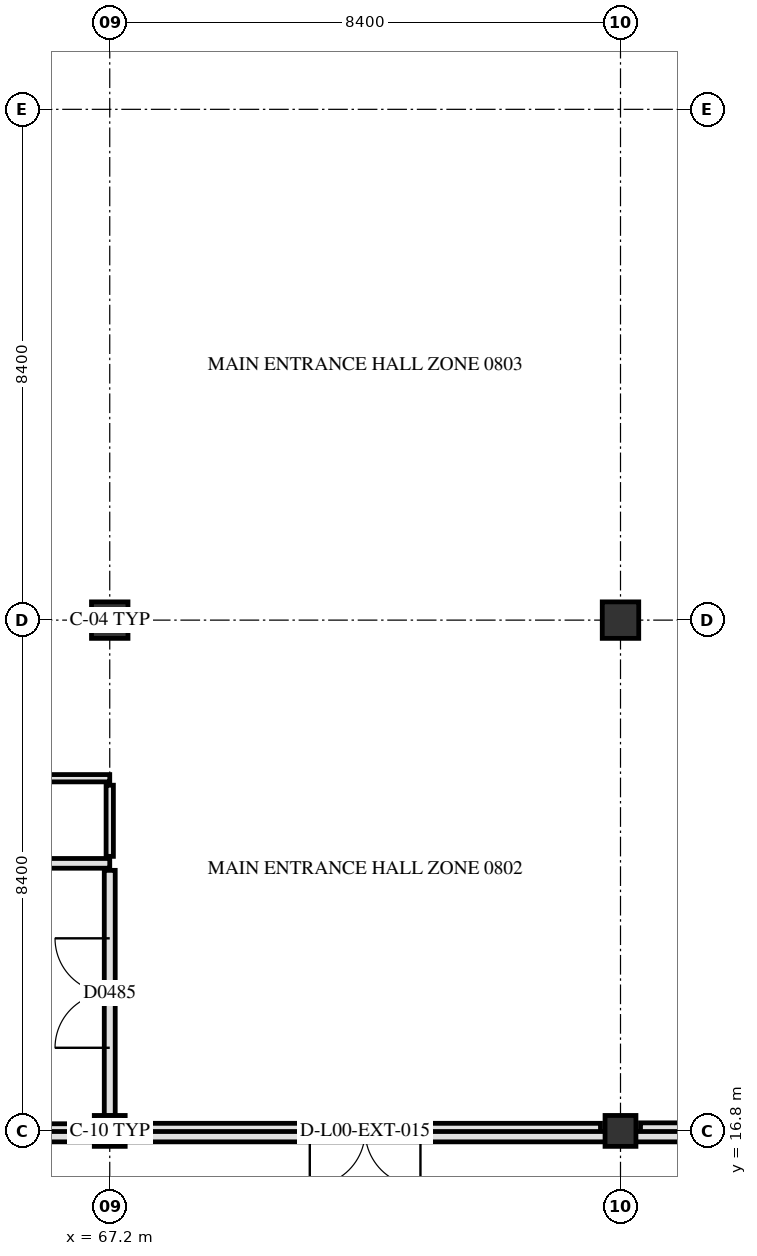
"""IFC4 building model, lengths in metres.
Left out: names, types, materials, properties, quantities, classifications, styles, units other than length and angle.
Written with IfcOpenShell. Run it as: python <this file> out.ifc"""

import sys

from ifc_helpers import new_model, si_unit, direction, frame, frame_2d, origin, origin_2d, place, context, subcontext, project, spatial, rectangle, hollow_circle, extrude, element, fill, save


model = new_model("IFC4")
c1 = context("Model", 3, precision=1e-05, world=origin(), true_north=direction((0.0, 1.0)))
c2 = subcontext(c1, "Body", "Model", "MODEL_VIEW")
j1 = project(units=[si_unit("LENGTHUNIT", "METRE"), si_unit("PLANEANGLEUNIT", "RADIAN")], contexts=[c1])
p1 = place(None, origin())
s1 = spatial("IfcSite", under=j1, at=p1, CompositionType="ELEMENT")
p2 = place(p1, origin())
s2 = spatial("IfcBuilding", under=s1, at=p2, CompositionType="ELEMENT")
p3 = place(p2, origin())
s3 = spatial("IfcBuildingStorey", under=s2, at=p3, CompositionType="ELEMENT", Elevation=0.0)
p4 = place(p3, frame((67.2, 16.8, 0.0), z_axis=(0.0, 0.0, 1.0), x_axis=(1.0, 0.0, 0.0)))
e1 = element("IfcColumn", 1, at=p4, inside=s3, PredefinedType="COLUMN", context=c2, shape_type="SweptSolid", body=[
    extrude(hollow_circle(Radius=0.254, WallThickness=0.02, at=origin_2d()), origin(), (0.0, 0.0, 1.0), 4.8),
])
p5 = place(p3, frame((67.2, 25.2, 0.0), z_axis=(0.0, 0.0, 1.0), x_axis=(1.0, 0.0, 0.0)))
e2 = element("IfcColumn", 2, at=p5, inside=s3, PredefinedType="COLUMN", context=c2, shape_type="SweptSolid", body=[
    extrude(rectangle(XDim=0.6, YDim=0.6, at=origin_2d()), origin(), (0.0, 0.0, 1.0), 4.8),
])
p6 = place(p3, frame((75.6, 16.8, 0.0), z_axis=(0.0, 0.0, 1.0), x_axis=(1.0, 0.0, 0.0)))
e3 = element("IfcColumn", 3, at=p6, inside=s3, PredefinedType="COLUMN", context=c2, shape_type="SweptSolid", body=[
    extrude(hollow_circle(Radius=0.254, WallThickness=0.02, at=origin_2d()), origin(), (0.0, 0.0, 1.0), 4.8),
])
p7 = place(p3, frame((75.6, 25.2, 0.0), z_axis=(0.0, 0.0, 1.0), x_axis=(1.0, 0.0, 0.0)))
e4 = element("IfcColumn", 4, at=p7, inside=s3, PredefinedType="COLUMN", context=c2, shape_type="SweptSolid", body=[
    extrude(rectangle(XDim=0.6, YDim=0.6, at=origin_2d()), origin(), (0.0, 0.0, 1.0), 4.8),
])
p8 = place(p3, frame((83.671, 16.8, 0.0), z_axis=(0.0, 0.0, 1.0), x_axis=(-1.0, 0.0, 0.0)))
e5 = element("IfcWall", 5, at=p8, inside=s3, PredefinedType="SOLIDWALL", context=c2, shape_type="SweptSolid", body=[
    extrude(rectangle(XDim=7.742, YDim=0.265, at=frame_2d((3.871, 0.0))), origin(), (0.0, 0.0, 1.0), 3.79),
])
p9 = place(p8, frame((2.771, 0.0, 0.0)))
e6 = element("IfcOpeningElement", 6, at=p9, cuts=e5, PredefinedType="OPENING", context=c2, shape_type="SweptSolid", body=[
    extrude(rectangle(XDim=2.2, YDim=2.35, at=frame_2d((1.1, 1.175))), frame((0.0, 0.142, 0.0), z_axis=(0.0, -1.0, 0.0), x_axis=(1.0, 0.0, 0.0)), (0.0, 0.0, 1.0), 0.285),
])
p10 = place(p3, frame((75.271, 16.8, 0.0), z_axis=(0.0, 0.0, 1.0), x_axis=(-1.0, 0.0, 0.0)))
e7 = element("IfcWall", 7, at=p10, inside=s3, PredefinedType="SOLIDWALL", context=c2, shape_type="SweptSolid", body=[
    extrude(rectangle(XDim=7.742, YDim=0.25, at=frame_2d((3.871, 0.0))), origin(), (0.0, 0.0, 1.0), 2.99),
])
p11 = place(p10, frame((2.961, 0.0, 0.0)))
e8 = element("IfcOpeningElement", 8, at=p11, cuts=e7, PredefinedType="OPENING", context=c2, shape_type="SweptSolid", body=[
    extrude(rectangle(XDim=1.82, YDim=2.28, at=frame_2d((0.91, 1.14))), frame((0.0, 0.135, 0.0), z_axis=(0.0, -1.0, 0.0), x_axis=(1.0, 0.0, 0.0)), (0.0, 0.0, 1.0), 0.27),
])
p12 = place(p3, frame((66.871, 16.8, 0.0), z_axis=(0.0, 0.0, 1.0), x_axis=(-1.0, 0.0, 0.0)))
e9 = element("IfcWall", 9, at=p12, inside=s3, PredefinedType="SOLIDWALL", context=c2, shape_type="SweptSolid", body=[
    extrude(rectangle(XDim=7.742, YDim=0.235, at=frame_2d((3.871, 0.0))), origin(), (0.0, 0.0, 1.0), 3.79),
])
p13 = place(p12, frame((2.771, 0.0, 0.0)))
e10 = element("IfcOpeningElement", 10, at=p13, cuts=e9, PredefinedType="OPENING", context=c2, shape_type="SweptSolid", body=[
    extrude(rectangle(XDim=2.2, YDim=2.35, at=frame_2d((1.1, 1.175))), frame((0.0, 0.127, 0.0), z_axis=(0.0, -1.0, 0.0), x_axis=(1.0, 0.0, 0.0)), (0.0, 0.0, 1.0), 0.255),
])
p14 = place(p3, frame((84.0, 16.705, 4.58), z_axis=(0.0, 0.0, 1.0), x_axis=(-1.0, 0.0, 0.0)))
e11 = element("IfcWall", 11, at=p14, inside=s3, PredefinedType="PARAPET", context=c2, shape_type="SweptSolid", body=[
    extrude(rectangle(XDim=25.2, YDim=0.17, at=frame_2d((12.6, 0.0))), origin(), (0.0, 0.0, 1.0), 0.47),
])
p15 = place(p3, frame((63.0, 21.2, 0.0), z_axis=(0.0, 0.0, 1.0), x_axis=(1.0, 0.0, 0.0)))
e12 = element("IfcWall", 12, at=p15, inside=s3, PredefinedType="PARTITIONING", context=c2, shape_type="SweptSolid", body=[
    extrude(rectangle(XDim=4.2, YDim=0.16, at=frame_2d((2.1, 0.0))), origin(), (0.0, 0.0, 1.0), 3.89),
])
p16 = place(p3, frame((63.0, 22.6, 0.0), z_axis=(0.0, 0.0, 1.0), x_axis=(1.0, 0.0, 0.0)))
e13 = element("IfcWall", 13, at=p16, inside=s3, PredefinedType="PARTITIONING", context=c2, shape_type="SweptSolid", body=[
    extrude(rectangle(XDim=4.2, YDim=0.12, at=frame_2d((2.1, 0.0))), origin(), (0.0, 0.0, 1.0), 3.89),
])
p17 = place(p16, frame((1.625, 0.0, 0.0)))
e14 = element("IfcOpeningElement", 14, at=p17, cuts=e13, PredefinedType="OPENING", context=c2, shape_type="SweptSolid", body=[
    extrude(rectangle(XDim=0.95, YDim=2.1, at=frame_2d((0.475, 1.05))), frame((0.0, 0.07, 0.0), z_axis=(0.0, -1.0, 0.0), x_axis=(1.0, 0.0, 0.0)), (0.0, 0.0, 1.0), 0.14),
])
p18 = place(p3, frame((67.2, 17.049, 0.0), z_axis=(0.0, 0.0, 1.0), x_axis=(0.0, 1.0, 0.0)))
e15 = element("IfcWall", 15, at=p18, inside=s3, PredefinedType="PARTITIONING", context=c2, shape_type="SweptSolid", body=[
    extrude(rectangle(XDim=4.036, YDim=0.18, at=frame_2d((2.018, 0.0))), origin(), (0.0, 0.0, 1.0), 3.89),
])
p19 = place(p18, frame((1.118, 0.0, 0.0)))
e16 = element("IfcOpeningElement", 16, at=p19, cuts=e15, PredefinedType="OPENING", context=c2, shape_type="SweptSolid", body=[
    extrude(rectangle(XDim=1.8, YDim=2.25, at=frame_2d((0.9, 1.125))), frame((0.0, 0.1, 0.0), z_axis=(0.0, -1.0, 0.0), x_axis=(1.0, 0.0, 0.0)), (0.0, 0.0, 1.0), 0.2),
])
p20 = place(p3, frame((67.2, 21.315, 0.0), z_axis=(0.0, 0.0, 1.0), x_axis=(0.0, 1.0, 0.0)))
e17 = element("IfcWall", 17, at=p20, inside=s3, PredefinedType="PARTITIONING", context=c2, shape_type="SweptSolid", body=[
    extrude(rectangle(XDim=1.17, YDim=0.12, at=frame_2d((0.585, 0.0))), origin(), (0.0, 0.0, 1.0), 3.89),
])
p21 = place(p11, origin())
e18 = element("IfcDoor", 18, at=p21, inside=s3, OperationType="DOUBLE_SWING_LEFT", PredefinedType="DOOR", context=c2, shape_type="SweptSolid", body=[
    extrude(rectangle(XDim=1.82, YDim=2.28, at=frame_2d((0.91, 1.14))), frame((0.0, 0.025, 0.0), z_axis=(0.0, -1.0, 0.0), x_axis=(1.0, 0.0, 0.0)), (0.0, 0.0, 1.0), 0.05),
])
fill(e8, e18)
p22 = place(p19, origin())
e19 = element("IfcDoor", 19, at=p22, inside=s3, OperationType="DOUBLE_SWING_RIGHT", PredefinedType="DOOR", context=c2, shape_type="SweptSolid", body=[
    extrude(rectangle(XDim=1.8, YDim=2.25, at=frame_2d((0.9, 1.125))), frame((0.0, 0.025, 0.0), z_axis=(0.0, -1.0, 0.0), x_axis=(1.0, 0.0, 0.0)), (0.0, 0.0, 1.0), 0.05),
])
fill(e16, e19)
save(model, sys.argv[1])
